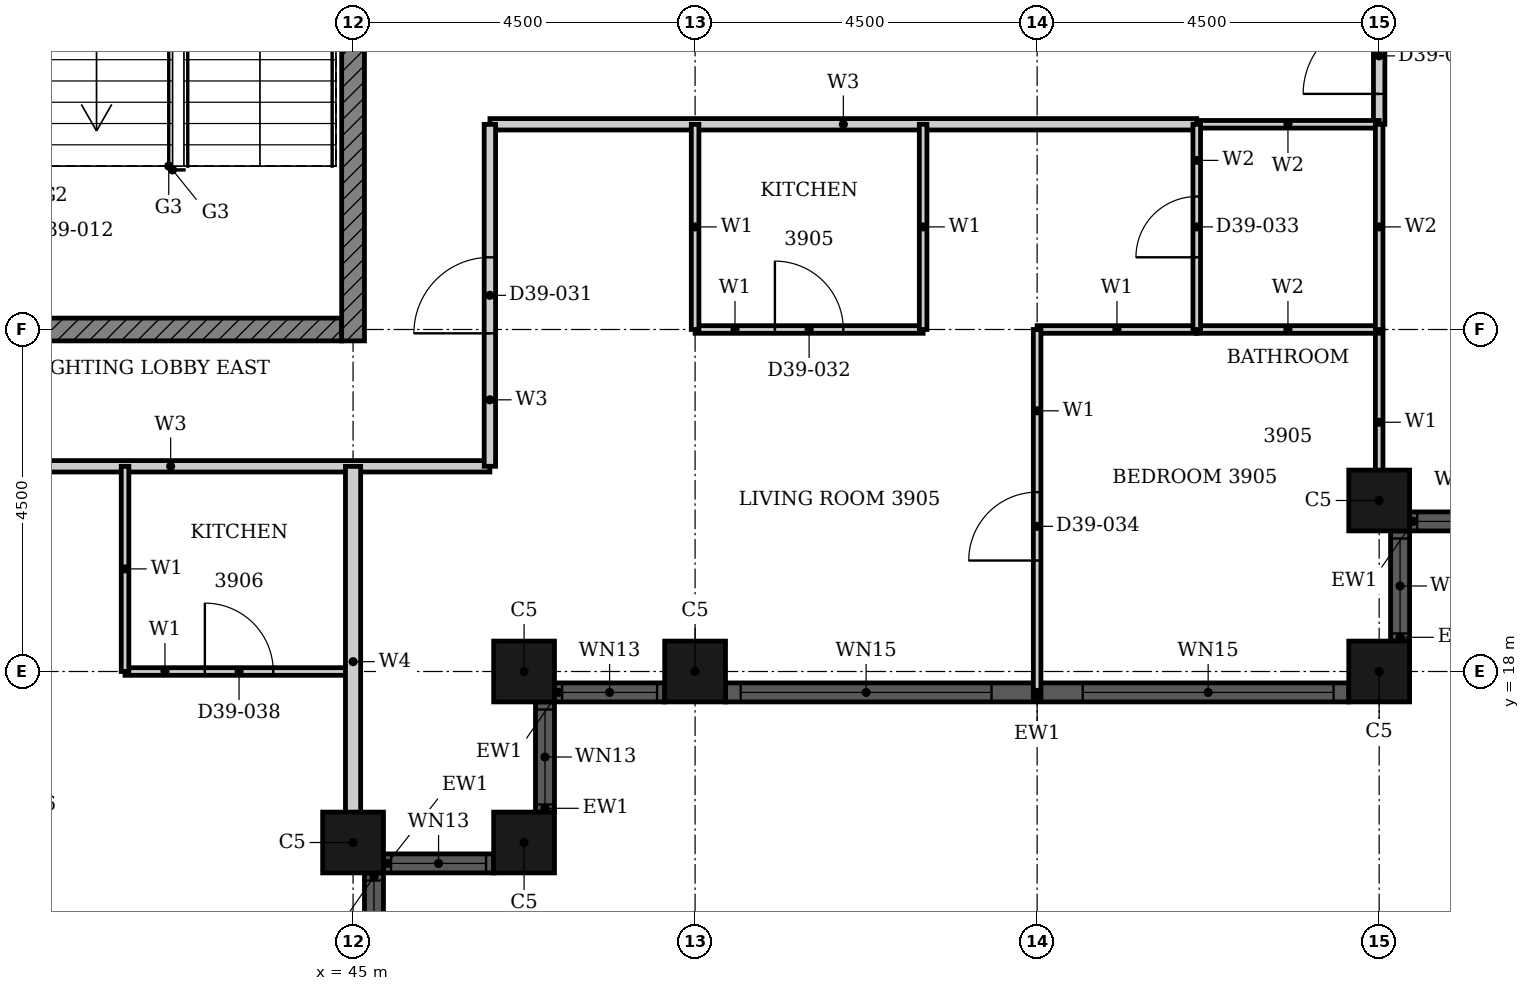
"""IFC4 building model, lengths in metres.
Left out: names, types, materials, properties, quantities, classifications, styles, units other than length and angle.
Written with IfcOpenShell. Run it as: python <this file> out.ifc"""

import sys

from ifc_helpers import new_model, si_unit, direction, frame, frame_2d, origin, origin_2d, place, context, subcontext, project, spatial, rectangle, hollow_rectangle, extrude, element, fill, save


model = new_model("IFC4")
c1 = context("Model", 3, precision=1e-05, world=origin(), true_north=direction((0.0, 1.0)))
c2 = subcontext(c1, "Body", "Model", "MODEL_VIEW")
j1 = project(units=[si_unit("LENGTHUNIT", "METRE"), si_unit("PLANEANGLEUNIT", "RADIAN")], contexts=[c1])
p1 = place(None, origin())
s1 = spatial("IfcSite", under=j1, at=p1, CompositionType="ELEMENT")
p2 = place(p1, origin())
s2 = spatial("IfcBuilding", under=s1, at=p2, CompositionType="ELEMENT")
p3 = place(p2, frame((0.0, 0.0, 158.0)))
s3 = spatial("IfcBuildingStorey", under=s2, at=p3, CompositionType="ELEMENT", Elevation=158.0)
for number, where, z_axis, x_axis in (
    (1, (45.0, 15.75, 0.0), (0.0, 0.0, 1.0), (1.0, 0.0, 0.0)),
    (2, (47.25, 15.75, 0.0), (0.0, 0.0, 1.0), (1.0, 0.0, 0.0)),
    (3, (47.25, 18.0, 0.0), (0.0, 0.0, 1.0), (1.0, 0.0, 0.0)),
    (4, (49.5, 18.0, 0.0), (0.0, 0.0, 1.0), (1.0, 0.0, 0.0)),
    (5, (58.5, 18.0, 0.0), (0.0, 0.0, 1.0), (1.0, 0.0, 0.0)),
    (6, (58.5, 20.25, 0.0), (0.0, 0.0, 1.0), (1.0, 0.0, 0.0)),
):
    element("IfcColumn", number, at=place(p3, frame(where, z_axis=z_axis, x_axis=x_axis)), inside=s3, PredefinedType="COLUMN", context=c2, shape_type="SweptSolid", body=[
        extrude(hollow_rectangle(XDim=0.8, YDim=0.8, WallThickness=0.025, at=origin_2d()), origin(), (0.0, 0.0, 1.0), 3.7),
    ])
p4 = place(p3, frame((45.275, 13.9, 0.0), z_axis=(0.0, 0.0, 1.0), x_axis=(0.0, 1.0, 0.0)))
e7 = element("IfcWall", 7, at=p4, inside=s3, PredefinedType="SOLIDWALL", context=c2, shape_type="SweptSolid", body=[
    extrude(rectangle(XDim=1.45, YDim=0.25, at=frame_2d((0.725, 0.0))), origin(), (0.0, 0.0, 1.0), 3.7),
])
p5 = place(p4, frame((0.1, 0.0, 0.9)))
e8 = element("IfcOpeningElement", 8, at=p5, cuts=e7, PredefinedType="OPENING", context=c2, shape_type="SweptSolid", body=[
    extrude(rectangle(XDim=1.25, YDim=1.85, at=frame_2d((0.625, 0.925))), frame((0.0, 0.135, 0.0), z_axis=(0.0, -1.0, 0.0), x_axis=(1.0, 0.0, 0.0)), (0.0, 0.0, 1.0), 0.27),
])
p6 = place(p3, frame((45.4, 15.475, 0.0), z_axis=(0.0, 0.0, 1.0), x_axis=(1.0, 0.0, 0.0)))
e9 = element("IfcWall", 9, at=p6, inside=s3, PredefinedType="SOLIDWALL", context=c2, shape_type="SweptSolid", body=[
    extrude(rectangle(XDim=1.45, YDim=0.25, at=frame_2d((0.725, 0.0))), origin(), (0.0, 0.0, 1.0), 3.7),
])
p7 = place(p6, frame((0.1, 0.0, 0.9)))
e10 = element("IfcOpeningElement", 10, at=p7, cuts=e9, PredefinedType="OPENING", context=c2, shape_type="SweptSolid", body=[
    extrude(rectangle(XDim=1.25, YDim=1.85, at=frame_2d((0.625, 0.925))), frame((0.0, 0.135, 0.0), z_axis=(0.0, -1.0, 0.0), x_axis=(1.0, 0.0, 0.0)), (0.0, 0.0, 1.0), 0.27),
])
p8 = place(p3, frame((47.525, 16.15, 0.0), z_axis=(0.0, 0.0, 1.0), x_axis=(0.0, 1.0, 0.0)))
e11 = element("IfcWall", 11, at=p8, inside=s3, PredefinedType="SOLIDWALL", context=c2, shape_type="SweptSolid", body=[
    extrude(rectangle(XDim=1.45, YDim=0.25, at=frame_2d((0.725, 0.0))), origin(), (0.0, 0.0, 1.0), 3.7),
])
p9 = place(p8, frame((0.1, 0.0, 0.9)))
e12 = element("IfcOpeningElement", 12, at=p9, cuts=e11, PredefinedType="OPENING", context=c2, shape_type="SweptSolid", body=[
    extrude(rectangle(XDim=1.25, YDim=1.85, at=frame_2d((0.625, 0.925))), frame((0.0, 0.135, 0.0), z_axis=(0.0, -1.0, 0.0), x_axis=(1.0, 0.0, 0.0)), (0.0, 0.0, 1.0), 0.27),
])
p10 = place(p3, frame((47.65, 17.725, 0.0), z_axis=(0.0, 0.0, 1.0), x_axis=(1.0, 0.0, 0.0)))
e13 = element("IfcWall", 13, at=p10, inside=s3, PredefinedType="SOLIDWALL", context=c2, shape_type="SweptSolid", body=[
    extrude(rectangle(XDim=1.45, YDim=0.25, at=frame_2d((0.725, 0.0))), origin(), (0.0, 0.0, 1.0), 3.7),
])
p11 = place(p10, frame((0.1, 0.0, 0.9)))
e14 = element("IfcOpeningElement", 14, at=p11, cuts=e13, PredefinedType="OPENING", context=c2, shape_type="SweptSolid", body=[
    extrude(rectangle(XDim=1.25, YDim=1.85, at=frame_2d((0.625, 0.925))), frame((0.0, 0.135, 0.0), z_axis=(0.0, -1.0, 0.0), x_axis=(1.0, 0.0, 0.0)), (0.0, 0.0, 1.0), 0.27),
])
p12 = place(p3, frame((49.9, 17.725, 0.0), z_axis=(0.0, 0.0, 1.0), x_axis=(1.0, 0.0, 0.0)))
e15 = element("IfcWall", 15, at=p12, inside=s3, PredefinedType="SOLIDWALL", context=c2, shape_type="SweptSolid", body=[
    extrude(rectangle(XDim=8.2, YDim=0.25, at=frame_2d((4.1, 0.0))), origin(), (0.0, 0.0, 1.0), 3.7),
])
p13 = place(p12, frame((0.2, 0.0, 0.45)))
e16 = element("IfcOpeningElement", 16, at=p13, cuts=e15, PredefinedType="OPENING", context=c2, shape_type="SweptSolid", body=[
    extrude(rectangle(XDim=3.3, YDim=2.3, at=frame_2d((1.65, 1.15))), frame((0.0, 0.135, 0.0), z_axis=(0.0, -1.0, 0.0), x_axis=(1.0, 0.0, 0.0)), (0.0, 0.0, 1.0), 0.27),
])
p14 = place(p12, frame((4.7, 0.0, 0.45)))
e17 = element("IfcOpeningElement", 17, at=p14, cuts=e15, PredefinedType="OPENING", context=c2, shape_type="SweptSolid", body=[
    extrude(rectangle(XDim=3.3, YDim=2.3, at=frame_2d((1.65, 1.15))), frame((0.0, 0.135, 0.0), z_axis=(0.0, -1.0, 0.0), x_axis=(1.0, 0.0, 0.0)), (0.0, 0.0, 1.0), 0.27),
])
p15 = place(p3, frame((58.775, 18.4, 0.0), z_axis=(0.0, 0.0, 1.0), x_axis=(0.0, 1.0, 0.0)))
e18 = element("IfcWall", 18, at=p15, inside=s3, PredefinedType="SOLIDWALL", context=c2, shape_type="SweptSolid", body=[
    extrude(rectangle(XDim=1.45, YDim=0.25, at=frame_2d((0.725, 0.0))), origin(), (0.0, 0.0, 1.0), 3.7),
])
p16 = place(p15, frame((0.1, 0.0, 0.9)))
e19 = element("IfcOpeningElement", 19, at=p16, cuts=e18, PredefinedType="OPENING", context=c2, shape_type="SweptSolid", body=[
    extrude(rectangle(XDim=1.25, YDim=1.85, at=frame_2d((0.625, 0.925))), frame((0.0, 0.135, 0.0), z_axis=(0.0, -1.0, 0.0), x_axis=(1.0, 0.0, 0.0)), (0.0, 0.0, 1.0), 0.27),
])
p17 = place(p3, frame((58.9, 19.975, 0.0), z_axis=(0.0, 0.0, 1.0), x_axis=(1.0, 0.0, 0.0)))
e20 = element("IfcWall", 20, at=p17, inside=s3, PredefinedType="SOLIDWALL", context=c2, shape_type="SweptSolid", body=[
    extrude(rectangle(XDim=1.45, YDim=0.25, at=frame_2d((0.725, 0.0))), origin(), (0.0, 0.0, 1.0), 3.7),
])
p18 = place(p17, frame((0.1, 0.0, 0.9)))
e21 = element("IfcOpeningElement", 21, at=p18, cuts=e20, PredefinedType="OPENING", context=c2, shape_type="SweptSolid", body=[
    extrude(rectangle(XDim=1.25, YDim=1.85, at=frame_2d((0.625, 0.925))), frame((0.0, 0.135, 0.0), z_axis=(0.0, -1.0, 0.0), x_axis=(1.0, 0.0, 0.0)), (0.0, 0.0, 1.0), 0.27),
])
p19 = place(p3, frame((32.911, 22.5, 0.0), z_axis=(0.0, 0.0, 1.0), x_axis=(1.0, 0.0, 0.0)))
e22 = element("IfcWall", 22, at=p19, inside=s3, PredefinedType="SHEAR", context=c2, shape_type="SweptSolid", body=[
    extrude(rectangle(XDim=11.939, YDim=0.3, at=frame_2d((5.97, 0.0))), origin(), (0.0, 0.0, 1.0), 3.4),
])
p20 = place(p19, frame((5.404, 0.0, 0.0)))
e23 = element("IfcOpeningElement", 23, at=p20, cuts=e22, PredefinedType="OPENING", context=c2, shape_type="SweptSolid", body=[
    extrude(rectangle(XDim=1.8, YDim=2.1, at=frame_2d((0.9, 1.05))), frame((0.0, 0.16, 0.0), z_axis=(0.0, -1.0, 0.0), x_axis=(1.0, 0.0, 0.0)), (0.0, 0.0, 1.0), 0.32),
])
p21 = place(p3, frame((45.0, 22.35, 0.0), z_axis=(0.0, 0.0, 1.0), x_axis=(0.0, 1.0, 0.0)))
e24 = element("IfcWall", 24, at=p21, inside=s3, PredefinedType="SHEAR", context=c2, shape_type="SweptSolid", body=[
    extrude(rectangle(XDim=9.3, YDim=0.3, at=frame_2d((4.65, 0.0))), origin(), (0.0, 0.0, 1.0), 3.4),
])
p22 = place(p3, frame((38.4, 20.7, 0.0), z_axis=(0.0, 0.0, 1.0), x_axis=(1.0, 0.0, 0.0)))
e25 = element("IfcWall", 25, at=p22, inside=s3, PredefinedType="PARTITIONING", context=c2, shape_type="SweptSolid", body=[
    extrude(rectangle(XDim=8.4, YDim=0.15, at=frame_2d((4.2, 0.0))), origin(), (0.0, 0.0, 1.0), 3.4),
])
p23 = place(p3, frame((46.801, 25.2, 0.0), z_axis=(0.0, 0.0, 1.0), x_axis=(1.0, 0.0, 0.0)))
e26 = element("IfcWall", 26, at=p23, inside=s3, PredefinedType="PARTITIONING", context=c2, shape_type="SweptSolid", body=[
    extrude(rectangle(XDim=9.299, YDim=0.15, at=frame_2d((4.649, 0.0))), origin(), (0.0, 0.0, 1.0), 3.4),
])
p24 = place(p3, frame((46.8, 20.7, 0.0), z_axis=(0.0, 0.0, 1.0), x_axis=(0.0, 1.0, 0.0)))
e27 = element("IfcWall", 27, at=p24, inside=s3, PredefinedType="PARTITIONING", context=c2, shape_type="SweptSolid", body=[
    extrude(rectangle(XDim=4.499, YDim=0.15, at=frame_2d((2.25, 0.0))), origin(), (0.0, 0.0, 1.0), 3.4),
])
p25 = place(p24, frame((1.75, 0.0, 0.0)))
e28 = element("IfcOpeningElement", 28, at=p25, cuts=e27, PredefinedType="OPENING", context=c2, shape_type="SweptSolid", body=[
    extrude(rectangle(XDim=1.0, YDim=2.2, at=frame_2d((0.5, 1.1))), frame((0.0, 0.085, 0.0), z_axis=(0.0, -1.0, 0.0), x_axis=(1.0, 0.0, 0.0)), (0.0, 0.0, 1.0), 0.17),
])
p26 = place(p3, frame((58.5, 25.2, 0.0), z_axis=(0.0, 0.0, 1.0), x_axis=(0.0, 1.0, 0.0)))
e29 = element("IfcWall", 29, at=p26, inside=s3, PredefinedType="PARTITIONING", context=c2, shape_type="SweptSolid", body=[
    extrude(rectangle(XDim=1.8, YDim=0.15, at=frame_2d((0.9, 0.0))), origin(), (0.0, 0.0, 1.0), 3.4),
])
p27 = place(p26, frame((0.4, 0.0, 0.0)))
e30 = element("IfcOpeningElement", 30, at=p27, cuts=e29, PredefinedType="OPENING", context=c2, shape_type="SweptSolid", body=[
    extrude(rectangle(XDim=1.0, YDim=2.1, at=frame_2d((0.5, 1.05))), frame((0.0, 0.085, 0.0), z_axis=(0.0, -1.0, 0.0), x_axis=(1.0, 0.0, 0.0)), (0.0, 0.0, 1.0), 0.17),
])
p28 = place(p3, frame((42.0, 18.0, 0.0), z_axis=(0.0, 0.0, 1.0), x_axis=(1.0, 0.0, 0.0)))
e31 = element("IfcWall", 31, at=p28, inside=s3, PredefinedType="PARTITIONING", context=c2, shape_type="SweptSolid", body=[
    extrude(rectangle(XDim=3.0, YDim=0.1, at=frame_2d((1.5, 0.0))), origin(), (0.0, 0.0, 1.0), 3.4),
])
p29 = place(p28, frame((1.05, 0.0, 0.0)))
e32 = element("IfcOpeningElement", 32, at=p29, cuts=e31, PredefinedType="OPENING", context=c2, shape_type="SweptSolid", body=[
    extrude(rectangle(XDim=0.9, YDim=2.1, at=frame_2d((0.45, 1.05))), frame((0.0, 0.06, 0.0), z_axis=(0.0, -1.0, 0.0), x_axis=(1.0, 0.0, 0.0)), (0.0, 0.0, 1.0), 0.12),
])
p30 = place(p3, frame((54.0, 22.5, 0.0), z_axis=(0.0, 0.0, 1.0), x_axis=(1.0, 0.0, 0.0)))
e33 = element("IfcWall", 33, at=p30, inside=s3, PredefinedType="PARTITIONING", context=c2, shape_type="SweptSolid", body=[
    extrude(rectangle(XDim=2.1, YDim=0.1, at=frame_2d((1.05, 0.0))), origin(), (0.0, 0.0, 1.0), 2.68),
])
p31 = place(p3, frame((49.5, 22.5, 0.0), z_axis=(0.0, 0.0, 1.0), x_axis=(1.0, 0.0, 0.0)))
e34 = element("IfcWall", 34, at=p31, inside=s3, PredefinedType="PARTITIONING", context=c2, shape_type="SweptSolid", body=[
    extrude(rectangle(XDim=3.0, YDim=0.1, at=frame_2d((1.5, 0.0))), origin(), (0.0, 0.0, 1.0), 2.68),
])
p32 = place(p31, frame((1.05, 0.0, 0.0)))
e35 = element("IfcOpeningElement", 35, at=p32, cuts=e34, PredefinedType="OPENING", context=c2, shape_type="SweptSolid", body=[
    extrude(rectangle(XDim=0.9, YDim=2.1, at=frame_2d((0.45, 1.05))), frame((0.0, 0.06, 0.0), z_axis=(0.0, -1.0, 0.0), x_axis=(1.0, 0.0, 0.0)), (0.0, 0.0, 1.0), 0.12),
])
p33 = place(p3, frame((42.0, 18.0, 0.0), z_axis=(0.0, 0.0, 1.0), x_axis=(0.0, 1.0, 0.0)))
e36 = element("IfcWall", 36, at=p33, inside=s3, PredefinedType="PARTITIONING", context=c2, shape_type="SweptSolid", body=[
    extrude(rectangle(XDim=2.7, YDim=0.1, at=frame_2d((1.35, 0.0))), origin(), (0.0, 0.0, 1.0), 3.4),
])
p34 = place(p3, frame((49.5, 22.5, 0.0), z_axis=(0.0, 0.0, 1.0), x_axis=(0.0, 1.0, 0.0)))
e37 = element("IfcWall", 37, at=p34, inside=s3, PredefinedType="PARTITIONING", context=c2, shape_type="SweptSolid", body=[
    extrude(rectangle(XDim=2.699, YDim=0.1, at=frame_2d((1.35, 0.0))), origin(), (0.0, 0.0, 1.0), 2.48),
])
p35 = place(p3, frame((52.5, 22.5, 0.0), z_axis=(0.0, 0.0, 1.0), x_axis=(0.0, 1.0, 0.0)))
e38 = element("IfcWall", 38, at=p35, inside=s3, PredefinedType="PARTITIONING", context=c2, shape_type="SweptSolid", body=[
    extrude(rectangle(XDim=2.7, YDim=0.1, at=frame_2d((1.35, 0.0))), origin(), (0.0, 0.0, 1.0), 3.4),
])
p36 = place(p3, frame((54.0, 17.66, 0.0), z_axis=(0.0, 0.0, 1.0), x_axis=(0.0, 1.0, 0.0)))
e39 = element("IfcWall", 39, at=p36, inside=s3, PredefinedType="PARTITIONING", context=c2, shape_type="SweptSolid", body=[
    extrude(rectangle(XDim=4.84, YDim=0.1, at=frame_2d((2.42, 0.0))), origin(), (0.0, 0.0, 1.0), 3.4),
])
p37 = place(p36, frame((1.8, 0.0, 0.0)))
e40 = element("IfcOpeningElement", 40, at=p37, cuts=e39, PredefinedType="OPENING", context=c2, shape_type="SweptSolid", body=[
    extrude(rectangle(XDim=0.9, YDim=2.1, at=frame_2d((0.45, 1.05))), frame((0.0, 0.06, 0.0), z_axis=(0.0, -1.0, 0.0), x_axis=(1.0, 0.0, 0.0)), (0.0, 0.0, 1.0), 0.12),
])
p38 = place(p3, frame((58.5, 20.06, 0.0), z_axis=(0.0, 0.0, 1.0), x_axis=(0.0, 1.0, 0.0)))
e41 = element("IfcWall", 41, at=p38, inside=s3, PredefinedType="PARTITIONING", context=c2, shape_type="SweptSolid", body=[
    extrude(rectangle(XDim=2.439, YDim=0.1, at=frame_2d((1.219, 0.0))), origin(), (0.0, 0.0, 1.0), 3.4),
])
p39 = place(p3, frame((45.0, 15.56, 0.0), z_axis=(0.0, 0.0, 1.0), x_axis=(0.0, 1.0, 0.0)))
e42 = element("IfcWall", 42, at=p39, inside=s3, PredefinedType="PARTITIONING", context=c2, shape_type="SweptSolid", body=[
    extrude(rectangle(XDim=5.139, YDim=0.2, at=frame_2d((2.569, 0.0))), origin(), (0.0, 0.0, 1.0), 3.4),
])
p40 = place(p3, frame((56.1, 22.5, 0.0), z_axis=(0.0, 0.0, 1.0), x_axis=(1.0, 0.0, 0.0)))
e43 = element("IfcWall", 43, at=p40, inside=s3, PredefinedType="PARTITIONING", context=c2, shape_type="SweptSolid", body=[
    extrude(rectangle(XDim=2.4, YDim=0.1, at=frame_2d((1.2, 0.0))), origin(), (0.0, 0.0, 1.0), 2.68),
])
p41 = place(p3, frame((56.1, 25.2, 0.0), z_axis=(0.0, 0.0, 1.0), x_axis=(1.0, 0.0, 0.0)))
e44 = element("IfcWall", 44, at=p41, inside=s3, PredefinedType="PARTITIONING", context=c2, shape_type="SweptSolid", body=[
    extrude(rectangle(XDim=2.4, YDim=0.1, at=frame_2d((1.2, 0.0))), origin(), (0.0, 0.0, 1.0), 3.4),
])
p42 = place(p3, frame((56.1, 22.5, 0.0), z_axis=(0.0, 0.0, 1.0), x_axis=(0.0, 1.0, 0.0)))
e45 = element("IfcWall", 45, at=p42, inside=s3, PredefinedType="PARTITIONING", context=c2, shape_type="SweptSolid", body=[
    extrude(rectangle(XDim=2.7, YDim=0.1, at=frame_2d((1.35, 0.0))), origin(), (0.0, 0.0, 1.0), 3.4),
])
p43 = place(p42, frame((0.95, 0.0, 0.0)))
e46 = element("IfcOpeningElement", 46, at=p43, cuts=e45, PredefinedType="OPENING", context=c2, shape_type="SweptSolid", body=[
    extrude(rectangle(XDim=0.8, YDim=2.1, at=frame_2d((0.4, 1.05))), frame((0.0, 0.06, 0.0), z_axis=(0.0, -1.0, 0.0), x_axis=(1.0, 0.0, 0.0)), (0.0, 0.0, 1.0), 0.12),
])
p44 = place(p3, frame((58.5, 22.5, 0.0), z_axis=(0.0, 0.0, 1.0), x_axis=(0.0, 1.0, 0.0)))
e47 = element("IfcWall", 47, at=p44, inside=s3, PredefinedType="PARTITIONING", context=c2, shape_type="SweptSolid", body=[
    extrude(rectangle(XDim=2.7, YDim=0.1, at=frame_2d((1.35, 0.0))), origin(), (0.0, 0.0, 1.0), 3.4),
])
p45 = place(p5, origin())
e48 = element("IfcWindow", 48, at=p45, inside=s3, PartitioningType="SINGLE_PANEL", PredefinedType="WINDOW", context=c2, shape_type="SweptSolid", body=[
    extrude(rectangle(XDim=1.25, YDim=1.85, at=frame_2d((0.625, 0.925))), frame((0.0, 0.03, 0.0), z_axis=(0.0, -1.0, 0.0), x_axis=(1.0, 0.0, 0.0)), (0.0, 0.0, 1.0), 0.06),
])
fill(e8, e48)
p46 = place(p7, origin())
e49 = element("IfcWindow", 49, at=p46, inside=s3, PartitioningType="SINGLE_PANEL", PredefinedType="WINDOW", context=c2, shape_type="SweptSolid", body=[
    extrude(rectangle(XDim=1.25, YDim=1.85, at=frame_2d((0.625, 0.925))), frame((0.0, 0.03, 0.0), z_axis=(0.0, -1.0, 0.0), x_axis=(1.0, 0.0, 0.0)), (0.0, 0.0, 1.0), 0.06),
])
fill(e10, e49)
p47 = place(p9, origin())
e50 = element("IfcWindow", 50, at=p47, inside=s3, PartitioningType="SINGLE_PANEL", PredefinedType="WINDOW", context=c2, shape_type="SweptSolid", body=[
    extrude(rectangle(XDim=1.25, YDim=1.85, at=frame_2d((0.625, 0.925))), frame((0.0, 0.03, 0.0), z_axis=(0.0, -1.0, 0.0), x_axis=(1.0, 0.0, 0.0)), (0.0, 0.0, 1.0), 0.06),
])
fill(e12, e50)
p48 = place(p11, origin())
e51 = element("IfcWindow", 51, at=p48, inside=s3, PartitioningType="SINGLE_PANEL", PredefinedType="WINDOW", context=c2, shape_type="SweptSolid", body=[
    extrude(rectangle(XDim=1.25, YDim=1.85, at=frame_2d((0.625, 0.925))), frame((0.0, 0.03, 0.0), z_axis=(0.0, -1.0, 0.0), x_axis=(1.0, 0.0, 0.0)), (0.0, 0.0, 1.0), 0.06),
])
fill(e14, e51)
p49 = place(p13, origin())
e52 = element("IfcWindow", 52, at=p49, inside=s3, PartitioningType="SINGLE_PANEL", PredefinedType="WINDOW", context=c2, shape_type="SweptSolid", body=[
    extrude(rectangle(XDim=3.3, YDim=2.3, at=frame_2d((1.65, 1.15))), frame((0.0, 0.03, 0.0), z_axis=(0.0, -1.0, 0.0), x_axis=(1.0, 0.0, 0.0)), (0.0, 0.0, 1.0), 0.06),
])
fill(e16, e52)
p50 = place(p14, origin())
e53 = element("IfcWindow", 53, at=p50, inside=s3, PartitioningType="SINGLE_PANEL", PredefinedType="WINDOW", context=c2, shape_type="SweptSolid", body=[
    extrude(rectangle(XDim=3.3, YDim=2.3, at=frame_2d((1.65, 1.15))), frame((0.0, 0.03, 0.0), z_axis=(0.0, -1.0, 0.0), x_axis=(1.0, 0.0, 0.0)), (0.0, 0.0, 1.0), 0.06),
])
fill(e17, e53)
p51 = place(p16, origin())
e54 = element("IfcWindow", 54, at=p51, inside=s3, PartitioningType="SINGLE_PANEL", PredefinedType="WINDOW", context=c2, shape_type="SweptSolid", body=[
    extrude(rectangle(XDim=1.25, YDim=1.85, at=frame_2d((0.625, 0.925))), frame((0.0, 0.03, 0.0), z_axis=(0.0, -1.0, 0.0), x_axis=(1.0, 0.0, 0.0)), (0.0, 0.0, 1.0), 0.06),
])
fill(e19, e54)
p52 = place(p18, origin())
e55 = element("IfcWindow", 55, at=p52, inside=s3, PartitioningType="SINGLE_PANEL", PredefinedType="WINDOW", context=c2, shape_type="SweptSolid", body=[
    extrude(rectangle(XDim=1.25, YDim=1.85, at=frame_2d((0.625, 0.925))), frame((0.0, 0.03, 0.0), z_axis=(0.0, -1.0, 0.0), x_axis=(1.0, 0.0, 0.0)), (0.0, 0.0, 1.0), 0.06),
])
fill(e21, e55)
p53 = place(p25, origin())
e56 = element("IfcDoor", 56, at=p53, inside=s3, OperationType="SINGLE_SWING_LEFT", PredefinedType="DOOR", context=c2, shape_type="SweptSolid", body=[
    extrude(rectangle(XDim=1.0, YDim=2.2, at=frame_2d((0.5, 1.1))), frame((0.0, 0.025, 0.0), z_axis=(0.0, -1.0, 0.0), x_axis=(1.0, 0.0, 0.0)), (0.0, 0.0, 1.0), 0.05),
])
fill(e28, e56)
p54 = place(p32, origin())
e57 = element("IfcDoor", 57, at=p54, inside=s3, OperationType="SINGLE_SWING_RIGHT", PredefinedType="DOOR", context=c2, shape_type="SweptSolid", body=[
    extrude(rectangle(XDim=0.9, YDim=2.1, at=frame_2d((0.45, 1.05))), frame((0.0, 0.025, 0.0), z_axis=(0.0, -1.0, 0.0), x_axis=(1.0, 0.0, 0.0)), (0.0, 0.0, 1.0), 0.05),
])
fill(e35, e57)
p55 = place(p43, origin())
e58 = element("IfcDoor", 58, at=p55, inside=s3, OperationType="SINGLE_SWING_LEFT", PredefinedType="DOOR", context=c2, shape_type="SweptSolid", body=[
    extrude(rectangle(XDim=0.8, YDim=2.1, at=frame_2d((0.4, 1.05))), frame((0.0, 0.025, 0.0), z_axis=(0.0, -1.0, 0.0), x_axis=(1.0, 0.0, 0.0)), (0.0, 0.0, 1.0), 0.05),
])
fill(e46, e58)
p56 = place(p37, origin())
e59 = element("IfcDoor", 59, at=p56, inside=s3, OperationType="SINGLE_SWING_RIGHT", PredefinedType="DOOR", context=c2, shape_type="SweptSolid", body=[
    extrude(rectangle(XDim=0.9, YDim=2.1, at=frame_2d((0.45, 1.05))), frame((0.0, 0.025, 0.0), z_axis=(0.0, -1.0, 0.0), x_axis=(1.0, 0.0, 0.0)), (0.0, 0.0, 1.0), 0.05),
])
fill(e40, e59)
p57 = place(p29, origin())
e60 = element("IfcDoor", 60, at=p57, inside=s3, OperationType="SINGLE_SWING_RIGHT", PredefinedType="DOOR", context=c2, shape_type="SweptSolid", body=[
    extrude(rectangle(XDim=0.9, YDim=2.1, at=frame_2d((0.45, 1.05))), frame((0.0, 0.025, 0.0), z_axis=(0.0, -1.0, 0.0), x_axis=(1.0, 0.0, 0.0)), (0.0, 0.0, 1.0), 0.05),
])
fill(e32, e60)
p58 = place(p27, origin())
e61 = element("IfcDoor", 61, at=p58, inside=s3, OperationType="SINGLE_SWING_LEFT", PredefinedType="DOOR", context=c2, shape_type="SweptSolid", body=[
    extrude(rectangle(XDim=1.0, YDim=2.1, at=frame_2d((0.5, 1.05))), frame((0.0, 0.025, 0.0), z_axis=(0.0, -1.0, 0.0), x_axis=(1.0, 0.0, 0.0)), (0.0, 0.0, 1.0), 0.05),
])
fill(e30, e61)
save(model, sys.argv[1])
